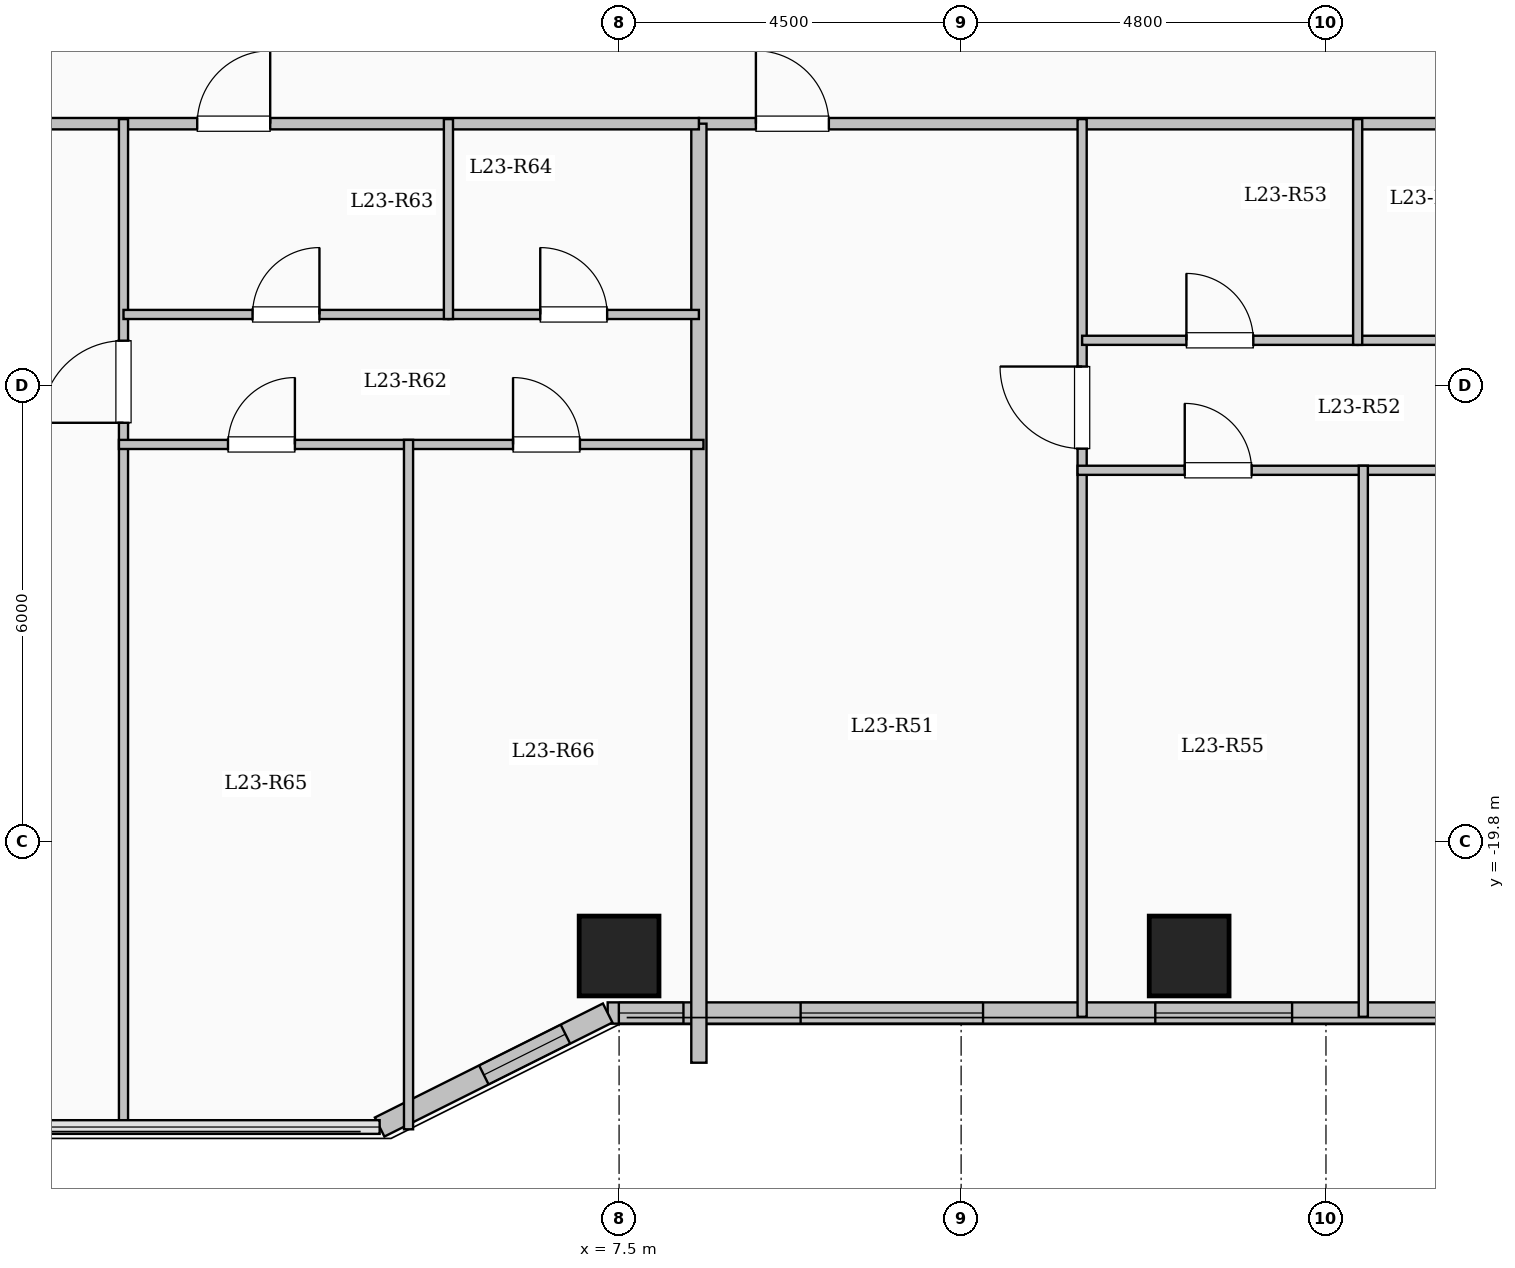
"""IFC4 building model, lengths in metres.
Left out: names, types, materials, properties, quantities, classifications, styles, units other than length and angle.
Written with IfcOpenShell. Run it as: python <this file> out.ifc"""

import sys

from ifc_helpers import new_model, si_unit, direction, frame, frame_2d, origin, origin_2d, place, context, subcontext, project, spatial, rectangle, extrude, element, fill, save


model = new_model("IFC4")
c1 = context("Model", 3, precision=1e-05, world=origin(), true_north=direction((0.0, 1.0)))
c2 = subcontext(c1, "Body", "Model", "MODEL_VIEW")
j1 = project(units=[si_unit("LENGTHUNIT", "METRE"), si_unit("PLANEANGLEUNIT", "RADIAN")], contexts=[c1])
p1 = place(None, origin())
s1 = spatial("IfcSite", under=j1, at=p1, CompositionType="ELEMENT")
p2 = place(p1, origin())
s2 = spatial("IfcBuilding", under=s1, at=p2, CompositionType="ELEMENT")
p3 = place(p2, frame((0.0, 0.0, 88.35)))
s3 = spatial("IfcBuildingStorey", under=s2, at=p3, CompositionType="ELEMENT", Elevation=88.35)
for number, where, z_axis, x_axis in (
    (1, (7.5, -21.3, 0.0), (0.0, 0.0, 1.0), (1.0, 0.0, 0.0)),
    (2, (15.0, -21.3, 0.0), (0.0, 0.0, 1.0), (1.0, 0.0, 0.0)),
):
    element("IfcColumn", number, at=place(p3, frame(where, z_axis=z_axis, x_axis=x_axis)), inside=s3, PredefinedType="COLUMN", context=c2, shape_type="SweptSolid", body=[
        extrude(rectangle(XDim=1.05, YDim=1.05, at=origin_2d()), origin(), (0.0, 0.0, 1.0), 3.35),
    ])
p4 = place(p3, frame((21.15, -22.05, 0.0), z_axis=(0.0, 0.0, 1.0), x_axis=(-1.0, 0.0, 0.0)))
e3 = element("IfcWall", 3, at=p4, inside=s3, PredefinedType="SOLIDWALL", context=c2, shape_type="SweptSolid", body=[
    extrude(rectangle(XDim=13.8, YDim=0.28, at=frame_2d((6.9, 0.0))), origin(), (0.0, 0.0, 1.0), 3.1),
])
p5 = place(p4, frame((1.057, 0.0, 0.9)))
e4 = element("IfcOpeningElement", 4, at=p5, cuts=e3, PredefinedType="OPENING", context=c2, shape_type="SweptSolid", body=[
    extrude(rectangle(XDim=1.8, YDim=1.65, at=frame_2d((0.9, 0.825))), frame((0.0, 0.15, 0.0), z_axis=(0.0, -1.0, 0.0), x_axis=(1.0, 0.0, 0.0)), (0.0, 0.0, 1.0), 0.3),
])
p6 = place(p4, frame((4.796, 0.0, 0.9)))
e5 = element("IfcOpeningElement", 5, at=p6, cuts=e3, PredefinedType="OPENING", context=c2, shape_type="SweptSolid", body=[
    extrude(rectangle(XDim=1.8, YDim=1.65, at=frame_2d((0.9, 0.825))), frame((0.0, 0.15, 0.0), z_axis=(0.0, -1.0, 0.0), x_axis=(1.0, 0.0, 0.0)), (0.0, 0.0, 1.0), 0.3),
])
p7 = place(p4, frame((8.862, 0.0, 0.9)))
e6 = element("IfcOpeningElement", 6, at=p7, cuts=e3, PredefinedType="OPENING", context=c2, shape_type="SweptSolid", body=[
    extrude(rectangle(XDim=2.4, YDim=1.8, at=frame_2d((1.2, 0.9))), frame((0.0, 0.15, 0.0), z_axis=(0.0, -1.0, 0.0), x_axis=(1.0, 0.0, 0.0)), (0.0, 0.0, 1.0), 0.3),
])
p8 = place(p4, frame((12.803, 0.0, 0.95)))
e7 = element("IfcOpeningElement", 7, at=p8, cuts=e3, PredefinedType="OPENING", context=c2, shape_type="SweptSolid", body=[
    extrude(rectangle(XDim=0.85, YDim=1.5, at=frame_2d((0.425, 0.75))), frame((0.0, 0.15, 0.0), z_axis=(0.0, -1.0, 0.0), x_axis=(1.0, 0.0, 0.0)), (0.0, 0.0, 1.0), 0.3),
])
p9 = place(p3, frame((7.35, -22.05, 0.0), z_axis=(0.0, 0.0, 1.0), x_axis=(-0.894427191, -0.4472135955, 0.0)))
e8 = element("IfcWall", 8, at=p9, inside=s3, PredefinedType="SOLIDWALL", context=c2, shape_type="SweptSolid", body=[
    extrude(rectangle(XDim=3.354, YDim=0.28, at=frame_2d((1.677, 0.0))), origin(), (0.0, 0.0, 1.0), 3.1),
])
p10 = place(p9, frame((0.622, 0.0, 0.95)))
e9 = element("IfcOpeningElement", 9, at=p10, cuts=e8, PredefinedType="OPENING", context=c2, shape_type="SweptSolid", body=[
    extrude(rectangle(XDim=1.2, YDim=1.5, at=frame_2d((0.6, 0.75))), frame((0.0, 0.15, 0.0), z_axis=(0.0, -1.0, 0.0), x_axis=(1.0, 0.0, 0.0)), (0.0, 0.0, 1.0), 0.3),
])
p11 = place(p3, frame((8.55, -10.35, 0.0), z_axis=(0.0, 0.0, 1.0), x_axis=(1.0, 0.0, 0.0)))
e10 = element("IfcWall", 10, at=p11, inside=s3, PredefinedType="PARTITIONING", context=c2, shape_type="SweptSolid", body=[
    extrude(rectangle(XDim=12.5, YDim=0.15, at=frame_2d((6.25, 0.0))), origin(), (0.0, 0.0, 1.0), 3.1),
])
p12 = place(p11, frame((0.75, 0.0, 0.0)))
e11 = element("IfcOpeningElement", 11, at=p12, cuts=e10, PredefinedType="OPENING", context=c2, shape_type="SweptSolid", body=[
    extrude(rectangle(XDim=0.96, YDim=2.15, at=frame_2d((0.48, 1.075))), frame((0.0, 0.085, 0.0), z_axis=(0.0, -1.0, 0.0), x_axis=(1.0, 0.0, 0.0)), (0.0, 0.0, 1.0), 0.17),
])
p13 = place(p3, frame((13.592, -22.1, 0.0), z_axis=(0.0, 0.0, 1.0), x_axis=(0.0, 1.0, 0.0)))
e12 = element("IfcWall", 12, at=p13, inside=s3, PredefinedType="PARTITIONING", context=c2, shape_type="SweptSolid", body=[
    extrude(rectangle(XDim=11.81, YDim=0.12, at=frame_2d((5.905, 0.0))), origin(), (0.0, 0.0, 1.0), 3.1),
])
p14 = place(p13, frame((7.475, 0.0, 0.0)))
e13 = element("IfcOpeningElement", 13, at=p14, cuts=e12, PredefinedType="OPENING", context=c2, shape_type="SweptSolid", body=[
    extrude(rectangle(XDim=1.08, YDim=2.15, at=frame_2d((0.54, 1.075))), frame((0.0, 0.07, 0.0), z_axis=(0.0, -1.0, 0.0), x_axis=(1.0, 0.0, 0.0)), (0.0, 0.0, 1.0), 0.14),
])
p15 = place(p3, frame((13.592, -13.2, 0.0), z_axis=(0.0, 0.0, 1.0), x_axis=(1.0, 0.0, 0.0)))
e14 = element("IfcWall", 14, at=p15, inside=s3, PredefinedType="PARTITIONING", context=c2, shape_type="SweptSolid", body=[
    extrude(rectangle(XDim=3.625, YDim=0.12, at=frame_2d((1.812, 0.0))), origin(), (0.0, 0.0, 1.0), 3.1),
])
p16 = place(p15, frame((1.372, 0.0, 0.0)))
e15 = element("IfcOpeningElement", 15, at=p16, cuts=e14, PredefinedType="OPENING", context=c2, shape_type="SweptSolid", body=[
    extrude(rectangle(XDim=0.88, YDim=2.1, at=frame_2d((0.44, 1.05))), frame((0.0, 0.07, 0.0), z_axis=(0.0, -1.0, 0.0), x_axis=(1.0, 0.0, 0.0)), (0.0, 0.0, 1.0), 0.14),
])
p17 = place(p3, frame((17.217, -13.2, 0.0), z_axis=(0.0, 0.0, 1.0), x_axis=(1.0, 0.0, 0.0)))
e16 = element("IfcWall", 16, at=p17, inside=s3, PredefinedType="PARTITIONING", context=c2, shape_type="SweptSolid", body=[
    extrude(rectangle(XDim=3.833, YDim=0.12, at=frame_2d((1.917, 0.0))), origin(), (0.0, 0.0, 1.0), 3.1),
])
p18 = place(p17, frame((1.477, 0.0, 0.0)))
e17 = element("IfcOpeningElement", 17, at=p18, cuts=e16, PredefinedType="OPENING", context=c2, shape_type="SweptSolid", body=[
    extrude(rectangle(XDim=0.88, YDim=2.1, at=frame_2d((0.44, 1.05))), frame((0.0, 0.07, 0.0), z_axis=(0.0, -1.0, 0.0), x_axis=(1.0, 0.0, 0.0)), (0.0, 0.0, 1.0), 0.14),
])
p19 = place(p3, frame((13.532, -14.91, 0.0), z_axis=(0.0, 0.0, 1.0), x_axis=(1.0, 0.0, 0.0)))
e18 = element("IfcWall", 18, at=p19, inside=s3, PredefinedType="PARTITIONING", context=c2, shape_type="SweptSolid", body=[
    extrude(rectangle(XDim=7.578, YDim=0.12, at=frame_2d((3.789, 0.0))), origin(), (0.0, 0.0, 1.0), 3.1),
])
p20 = place(p19, frame((1.41, 0.0, 0.0)))
e19 = element("IfcOpeningElement", 19, at=p20, cuts=e18, PredefinedType="OPENING", context=c2, shape_type="SweptSolid", body=[
    extrude(rectangle(XDim=0.88, YDim=2.1, at=frame_2d((0.44, 1.05))), frame((0.0, 0.07, 0.0), z_axis=(0.0, -1.0, 0.0), x_axis=(1.0, 0.0, 0.0)), (0.0, 0.0, 1.0), 0.14),
])
p21 = place(p19, frame((5.109, 0.0, 0.0)))
e20 = element("IfcOpeningElement", 20, at=p21, cuts=e18, PredefinedType="OPENING", context=c2, shape_type="SweptSolid", body=[
    extrude(rectangle(XDim=0.88, YDim=2.1, at=frame_2d((0.44, 1.05))), frame((0.0, 0.07, 0.0), z_axis=(0.0, -1.0, 0.0), x_axis=(1.0, 0.0, 0.0)), (0.0, 0.0, 1.0), 0.14),
])
p22 = place(p3, frame((17.217, -13.26, 0.0), z_axis=(0.0, 0.0, 1.0), x_axis=(0.0, 1.0, 0.0)))
e21 = element("IfcWall", 21, at=p22, inside=s3, PredefinedType="PARTITIONING", context=c2, shape_type="SweptSolid", body=[
    extrude(rectangle(XDim=2.97, YDim=0.12, at=frame_2d((1.485, 0.0))), origin(), (0.0, 0.0, 1.0), 3.1),
])
p23 = place(p3, frame((17.291, -22.1, 0.0), z_axis=(0.0, 0.0, 1.0), x_axis=(0.0, 1.0, 0.0)))
e22 = element("IfcWall", 22, at=p23, inside=s3, PredefinedType="PARTITIONING", context=c2, shape_type="SweptSolid", body=[
    extrude(rectangle(XDim=7.25, YDim=0.12, at=frame_2d((3.625, 0.0))), origin(), (0.0, 0.0, 1.0), 3.1),
])
p24 = place(p3, frame((8.55, -22.704, 0.0), z_axis=(0.0, 0.0, 1.0), x_axis=(0.0, 1.0, 0.0)))
e23 = element("IfcWall", 23, at=p24, inside=s3, PredefinedType="SOLIDWALL", context=c2, shape_type="SweptSolid", body=[
    extrude(rectangle(XDim=12.354, YDim=0.2, at=frame_2d((6.177, 0.0))), origin(), (0.0, 0.0, 1.0), 3.1),
])
p25 = place(p3, frame((-8.55, -10.35, 0.0), z_axis=(0.0, 0.0, 1.0), x_axis=(1.0, 0.0, 0.0)))
e24 = element("IfcWall", 24, at=p25, inside=s3, PredefinedType="PARTITIONING", context=c2, shape_type="SweptSolid", body=[
    extrude(rectangle(XDim=17.1, YDim=0.15, at=frame_2d((8.55, 0.0))), origin(), (0.0, 0.0, 1.0), 3.1),
])
p26 = place(p25, frame((1.15, 0.0, 0.0)))
e25 = element("IfcOpeningElement", 25, at=p26, cuts=e24, PredefinedType="OPENING", context=c2, shape_type="SweptSolid", body=[
    extrude(rectangle(XDim=0.96, YDim=2.15, at=frame_2d((0.48, 1.075))), frame((0.0, 0.085, 0.0), z_axis=(0.0, -1.0, 0.0), x_axis=(1.0, 0.0, 0.0)), (0.0, 0.0, 1.0), 0.17),
])
p27 = place(p25, frame((10.5, 0.0, 0.0)))
e26 = element("IfcOpeningElement", 26, at=p27, cuts=e24, PredefinedType="OPENING", context=c2, shape_type="SweptSolid", body=[
    extrude(rectangle(XDim=0.96, YDim=2.15, at=frame_2d((0.48, 1.075))), frame((0.0, 0.085, 0.0), z_axis=(0.0, -1.0, 0.0), x_axis=(1.0, 0.0, 0.0)), (0.0, 0.0, 1.0), 0.17),
])
p28 = place(p3, frame((0.98, -23.58, 0.0), z_axis=(0.0, 0.0, 1.0), x_axis=(0.0, 1.0, 0.0)))
e27 = element("IfcWall", 27, at=p28, inside=s3, PredefinedType="PARTITIONING", context=c2, shape_type="SweptSolid", body=[
    extrude(rectangle(XDim=13.29, YDim=0.12, at=frame_2d((6.645, 0.0))), origin(), (0.0, 0.0, 1.0), 3.1),
])
p29 = place(p28, frame((9.295, 0.0, 0.0)))
e28 = element("IfcOpeningElement", 28, at=p29, cuts=e27, PredefinedType="OPENING", context=c2, shape_type="SweptSolid", body=[
    extrude(rectangle(XDim=1.08, YDim=2.15, at=frame_2d((0.54, 1.075))), frame((0.0, 0.07, 0.0), z_axis=(0.0, -1.0, 0.0), x_axis=(1.0, 0.0, 0.0)), (0.0, 0.0, 1.0), 0.14),
])
p30 = place(p3, frame((0.98, -12.86, 0.0), z_axis=(0.0, 0.0, 1.0), x_axis=(1.0, 0.0, 0.0)))
e29 = element("IfcWall", 29, at=p30, inside=s3, PredefinedType="PARTITIONING", context=c2, shape_type="SweptSolid", body=[
    extrude(rectangle(XDim=4.275, YDim=0.12, at=frame_2d((2.137, 0.0))), origin(), (0.0, 0.0, 1.0), 3.1),
])
p31 = place(p30, frame((1.698, 0.0, 0.0)))
e30 = element("IfcOpeningElement", 30, at=p31, cuts=e29, PredefinedType="OPENING", context=c2, shape_type="SweptSolid", body=[
    extrude(rectangle(XDim=0.88, YDim=2.1, at=frame_2d((0.44, 1.05))), frame((0.0, 0.07, 0.0), z_axis=(0.0, -1.0, 0.0), x_axis=(1.0, 0.0, 0.0)), (0.0, 0.0, 1.0), 0.14),
])
p32 = place(p3, frame((5.255, -12.86, 0.0), z_axis=(0.0, 0.0, 1.0), x_axis=(1.0, 0.0, 0.0)))
e31 = element("IfcWall", 31, at=p32, inside=s3, PredefinedType="PARTITIONING", context=c2, shape_type="SweptSolid", body=[
    extrude(rectangle(XDim=3.295, YDim=0.12, at=frame_2d((1.647, 0.0))), origin(), (0.0, 0.0, 1.0), 3.1),
])
p33 = place(p32, frame((1.208, 0.0, 0.0)))
e32 = element("IfcOpeningElement", 32, at=p33, cuts=e31, PredefinedType="OPENING", context=c2, shape_type="SweptSolid", body=[
    extrude(rectangle(XDim=0.88, YDim=2.1, at=frame_2d((0.44, 1.05))), frame((0.0, 0.07, 0.0), z_axis=(0.0, -1.0, 0.0), x_axis=(1.0, 0.0, 0.0)), (0.0, 0.0, 1.0), 0.14),
])
p34 = place(p3, frame((0.92, -14.57, 0.0), z_axis=(0.0, 0.0, 1.0), x_axis=(1.0, 0.0, 0.0)))
e33 = element("IfcWall", 33, at=p34, inside=s3, PredefinedType="PARTITIONING", context=c2, shape_type="SweptSolid", body=[
    extrude(rectangle(XDim=7.69, YDim=0.12, at=frame_2d((3.845, 0.0))), origin(), (0.0, 0.0, 1.0), 2.635),
])
p35 = place(p34, frame((1.435, 0.0, 0.0)))
e34 = element("IfcOpeningElement", 34, at=p35, cuts=e33, PredefinedType="OPENING", context=c2, shape_type="SweptSolid", body=[
    extrude(rectangle(XDim=0.88, YDim=2.1, at=frame_2d((0.44, 1.05))), frame((0.0, 0.07, 0.0), z_axis=(0.0, -1.0, 0.0), x_axis=(1.0, 0.0, 0.0)), (0.0, 0.0, 1.0), 0.14),
])
p36 = place(p34, frame((5.185, 0.0, 0.0)))
e35 = element("IfcOpeningElement", 35, at=p36, cuts=e33, PredefinedType="OPENING", context=c2, shape_type="SweptSolid", body=[
    extrude(rectangle(XDim=0.88, YDim=2.1, at=frame_2d((0.44, 1.05))), frame((0.0, 0.07, 0.0), z_axis=(0.0, -1.0, 0.0), x_axis=(1.0, 0.0, 0.0)), (0.0, 0.0, 1.0), 0.14),
])
p37 = place(p3, frame((5.255, -12.92, 0.0), z_axis=(0.0, 0.0, 1.0), x_axis=(0.0, 1.0, 0.0)))
e36 = element("IfcWall", 36, at=p37, inside=s3, PredefinedType="PARTITIONING", context=c2, shape_type="SweptSolid", body=[
    extrude(rectangle(XDim=2.63, YDim=0.12, at=frame_2d((1.315, 0.0))), origin(), (0.0, 0.0, 1.0), 3.1),
])
p38 = place(p3, frame((4.73, -23.58, 0.0), z_axis=(0.0, 0.0, 1.0), x_axis=(0.0, 1.0, 0.0)))
e37 = element("IfcWall", 37, at=p38, inside=s3, PredefinedType="PARTITIONING", context=c2, shape_type="SweptSolid", body=[
    extrude(rectangle(XDim=9.07, YDim=0.12, at=frame_2d((4.535, 0.0))), origin(), (0.0, 0.0, 1.0), 3.1),
])
p39 = place(p6, origin())
e38 = element("IfcWindow", 38, at=p39, inside=s3, PartitioningType="SINGLE_PANEL", PredefinedType="WINDOW", context=c2, shape_type="SweptSolid", body=[
    extrude(rectangle(XDim=1.8, YDim=1.65, at=frame_2d((0.9, 0.825))), frame((0.0, 0.03, 0.0), z_axis=(0.0, -1.0, 0.0), x_axis=(1.0, 0.0, 0.0)), (0.0, 0.0, 1.0), 0.06),
])
fill(e5, e38)
p40 = place(p7, origin())
e39 = element("IfcWindow", 39, at=p40, inside=s3, PartitioningType="SINGLE_PANEL", PredefinedType="WINDOW", context=c2, shape_type="SweptSolid", body=[
    extrude(rectangle(XDim=2.4, YDim=1.8, at=frame_2d((1.2, 0.9))), frame((0.0, 0.03, 0.0), z_axis=(0.0, -1.0, 0.0), x_axis=(1.0, 0.0, 0.0)), (0.0, 0.0, 1.0), 0.06),
])
fill(e6, e39)
p41 = place(p8, origin())
e40 = element("IfcWindow", 40, at=p41, inside=s3, PartitioningType="SINGLE_PANEL", PredefinedType="WINDOW", context=c2, shape_type="SweptSolid", body=[
    extrude(rectangle(XDim=0.85, YDim=1.5, at=frame_2d((0.425, 0.75))), frame((0.0, 0.03, 0.0), z_axis=(0.0, -1.0, 0.0), x_axis=(1.0, 0.0, 0.0)), (0.0, 0.0, 1.0), 0.06),
])
fill(e7, e40)
p42 = place(p10, origin())
e41 = element("IfcWindow", 41, at=p42, inside=s3, PartitioningType="SINGLE_PANEL", PredefinedType="WINDOW", context=c2, shape_type="SweptSolid", body=[
    extrude(rectangle(XDim=1.2, YDim=1.5, at=frame_2d((0.6, 0.75))), frame((0.0, 0.03, 0.0), z_axis=(0.0, -1.0, 0.0), x_axis=(1.0, 0.0, 0.0)), (0.0, 0.0, 1.0), 0.06),
])
fill(e9, e41)
p43 = place(p12, origin())
e42 = element("IfcDoor", 42, at=p43, inside=s3, OperationType="SINGLE_SWING_LEFT", PredefinedType="DOOR", context=c2, shape_type="SweptSolid", body=[
    extrude(rectangle(XDim=0.96, YDim=2.15, at=frame_2d((0.48, 1.075))), frame((0.0, 0.025, 0.0), z_axis=(0.0, -1.0, 0.0), x_axis=(1.0, 0.0, 0.0)), (0.0, 0.0, 1.0), 0.05),
])
fill(e11, e42)
p44 = place(p14, origin())
e43 = element("IfcDoor", 43, at=p44, inside=s3, OperationType="SINGLE_SWING_RIGHT", PredefinedType="DOOR", context=c2, shape_type="SweptSolid", body=[
    extrude(rectangle(XDim=1.08, YDim=2.15, at=frame_2d((0.54, 1.075))), frame((0.0, 0.025, 0.0), z_axis=(0.0, -1.0, 0.0), x_axis=(1.0, 0.0, 0.0)), (0.0, 0.0, 1.0), 0.05),
])
fill(e13, e43)
p45 = place(p16, origin())
e44 = element("IfcDoor", 44, at=p45, inside=s3, OperationType="SINGLE_SWING_LEFT", PredefinedType="DOOR", context=c2, shape_type="SweptSolid", body=[
    extrude(rectangle(XDim=0.88, YDim=2.1, at=frame_2d((0.44, 1.05))), frame((0.0, 0.025, 0.0), z_axis=(0.0, -1.0, 0.0), x_axis=(1.0, 0.0, 0.0)), (0.0, 0.0, 1.0), 0.05),
])
fill(e15, e44)
p46 = place(p20, origin())
e45 = element("IfcDoor", 45, at=p46, inside=s3, OperationType="SINGLE_SWING_LEFT", PredefinedType="DOOR", context=c2, shape_type="SweptSolid", body=[
    extrude(rectangle(XDim=0.88, YDim=2.1, at=frame_2d((0.44, 1.05))), frame((0.0, 0.025, 0.0), z_axis=(0.0, -1.0, 0.0), x_axis=(1.0, 0.0, 0.0)), (0.0, 0.0, 1.0), 0.05),
])
fill(e19, e45)
p47 = place(p27, origin())
e46 = element("IfcDoor", 46, at=p47, inside=s3, OperationType="SINGLE_SWING_RIGHT", PredefinedType="DOOR", context=c2, shape_type="SweptSolid", body=[
    extrude(rectangle(XDim=0.96, YDim=2.15, at=frame_2d((0.48, 1.075))), frame((0.0, 0.025, 0.0), z_axis=(0.0, -1.0, 0.0), x_axis=(1.0, 0.0, 0.0)), (0.0, 0.0, 1.0), 0.05),
])
fill(e26, e46)
p48 = place(p29, origin())
e47 = element("IfcDoor", 47, at=p48, inside=s3, OperationType="SINGLE_SWING_LEFT", PredefinedType="DOOR", context=c2, shape_type="SweptSolid", body=[
    extrude(rectangle(XDim=1.08, YDim=2.15, at=frame_2d((0.54, 1.075))), frame((0.0, 0.025, 0.0), z_axis=(0.0, -1.0, 0.0), x_axis=(1.0, 0.0, 0.0)), (0.0, 0.0, 1.0), 0.05),
])
fill(e28, e47)
p49 = place(p31, origin())
e48 = element("IfcDoor", 48, at=p49, inside=s3, OperationType="SINGLE_SWING_RIGHT", PredefinedType="DOOR", context=c2, shape_type="SweptSolid", body=[
    extrude(rectangle(XDim=0.88, YDim=2.1, at=frame_2d((0.44, 1.05))), frame((0.0, 0.025, 0.0), z_axis=(0.0, -1.0, 0.0), x_axis=(1.0, 0.0, 0.0)), (0.0, 0.0, 1.0), 0.05),
])
fill(e30, e48)
p50 = place(p33, origin())
e49 = element("IfcDoor", 49, at=p50, inside=s3, OperationType="SINGLE_SWING_LEFT", PredefinedType="DOOR", context=c2, shape_type="SweptSolid", body=[
    extrude(rectangle(XDim=0.88, YDim=2.1, at=frame_2d((0.44, 1.05))), frame((0.0, 0.025, 0.0), z_axis=(0.0, -1.0, 0.0), x_axis=(1.0, 0.0, 0.0)), (0.0, 0.0, 1.0), 0.05),
])
fill(e32, e49)
p51 = place(p35, origin())
e50 = element("IfcDoor", 50, at=p51, inside=s3, OperationType="SINGLE_SWING_RIGHT", PredefinedType="DOOR", context=c2, shape_type="SweptSolid", body=[
    extrude(rectangle(XDim=0.88, YDim=2.1, at=frame_2d((0.44, 1.05))), frame((0.0, 0.025, 0.0), z_axis=(0.0, -1.0, 0.0), x_axis=(1.0, 0.0, 0.0)), (0.0, 0.0, 1.0), 0.05),
])
fill(e34, e50)
p52 = place(p36, origin())
e51 = element("IfcDoor", 51, at=p52, inside=s3, OperationType="SINGLE_SWING_LEFT", PredefinedType="DOOR", context=c2, shape_type="SweptSolid", body=[
    extrude(rectangle(XDim=0.88, YDim=2.1, at=frame_2d((0.44, 1.05))), frame((0.0, 0.025, 0.0), z_axis=(0.0, -1.0, 0.0), x_axis=(1.0, 0.0, 0.0)), (0.0, 0.0, 1.0), 0.05),
])
fill(e35, e51)
save(model, sys.argv[1])
